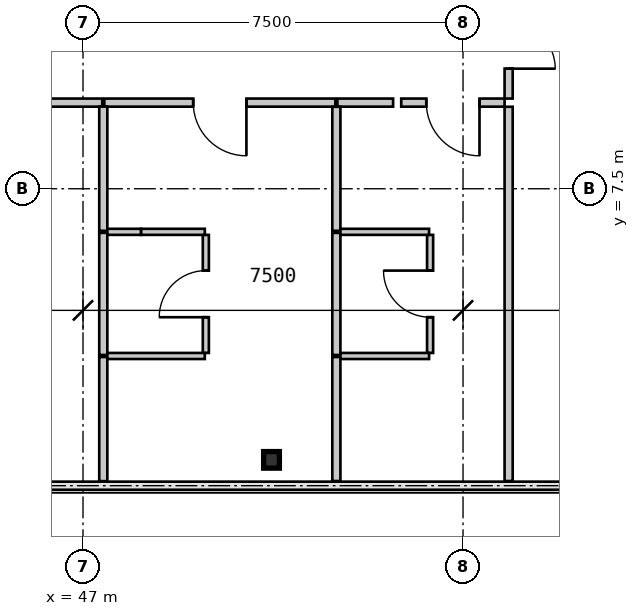
"""IFC4 building model, lengths in metres.
Left out: names, types, materials, properties, quantities, classifications, styles, units other than length and angle.
Written with IfcOpenShell. Run it as: python <this file> out.ifc"""

import sys

from ifc_helpers import new_model, si_unit, direction, frame, frame_2d, origin, origin_2d, place, context, subcontext, project, spatial, rectangle, i_section, extrude, source, transform, mapped, element, fill, save


model = new_model("IFC4")
c1 = context("Model", 3, precision=1e-05, world=origin(), true_north=direction((0.0, 1.0)))
c2 = subcontext(c1, "Body", "Model", "MODEL_VIEW")
j1 = project(units=[si_unit("LENGTHUNIT", "METRE"), si_unit("PLANEANGLEUNIT", "RADIAN")], contexts=[c1])
p1 = place(None, origin())
s1 = spatial("IfcSite", under=j1, at=p1, CompositionType="ELEMENT")
p2 = place(p1, origin())
s2 = spatial("IfcBuilding", under=s1, at=p2, CompositionType="ELEMENT")
p3 = place(p2, frame((0.0, 0.0, 19.95)))
s3 = spatial("IfcBuildingStorey", under=s2, at=p3, CompositionType="ELEMENT", Elevation=19.95)
m1 = source(origin(), c2, "Body", "SweptSolid", [
    extrude(i_section(OverallWidth=0.311, OverallDepth=0.327, WebThickness=0.016, FlangeThickness=0.025, at=origin_2d()), origin(), (0.0, 0.0, 1.0), 3.15),
])
p4 = place(p3, frame((50.72, 2.15, 0.0), z_axis=(0.0, 0.0, 1.0), x_axis=(1.0, 0.0, 0.0)))
e1 = element("IfcColumn", 1, at=p4, inside=s3, PredefinedType="COLUMN", context=c2, shape_type="MappedRepresentation", body=[
    mapped(m1, transform((0.0, 0.0, 0.0), scale=1.0)),
])
m2 = source(origin(), c2, "Body", "SweptSolid", [
    extrude(rectangle(XDim=2.04, YDim=0.16, at=frame_2d((1.02, 0.0))), origin(), (0.0, 0.0, 1.0), 2.93),
])
p5 = place(p3, frame((55.32, 9.2, 0.0), z_axis=(0.0, 0.0, 1.0), x_axis=(-1.0, 0.0, 0.0)))
e2 = element("IfcWall", 2, at=p5, inside=s3, PredefinedType="PARTITIONING", context=c2, shape_type="MappedRepresentation", body=[
    mapped(m2, transform((0.0, 0.0, 0.0), scale=1.0)),
])
m3 = source(origin(), c2, "Body", "SweptSolid", [
    extrude(rectangle(XDim=1.05, YDim=2.1, at=frame_2d((0.525, 1.05))), frame((0.0, 0.09, 0.0), z_axis=(0.0, -1.0, 0.0), x_axis=(1.0, 0.0, 0.0)), (0.0, 0.0, 1.0), 0.18),
])
p6 = place(p5, frame((0.495, 0.0, 0.0)))
e3 = element("IfcOpeningElement", 3, at=p6, cuts=e2, PredefinedType="OPENING", context=c2, shape_type="MappedRepresentation", body=[
    mapped(m3, transform((0.0, 0.0, 0.0), scale=1.0)),
])
m4 = source(origin(), c2, "Body", "SweptSolid", [
    extrude(rectangle(XDim=2.1, YDim=0.16, at=frame_2d((1.05, 0.0))), origin(), (0.0, 0.0, 1.0), 2.93),
])
p7 = place(p3, frame((55.4, 11.38, 0.0), z_axis=(0.0, 0.0, 1.0), x_axis=(0.0, -1.0, 0.0)))
e4 = element("IfcWall", 4, at=p7, inside=s3, PredefinedType="PARTITIONING", context=c2, shape_type="MappedRepresentation", body=[
    mapped(m4, transform((0.0, 0.0, 0.0), scale=1.0)),
])
m5 = source(origin(), c2, "Body", "SweptSolid", [
    extrude(rectangle(XDim=0.92, YDim=2.1, at=frame_2d((0.46, 1.05))), frame((0.0, 0.09, 0.0), z_axis=(0.0, -1.0, 0.0), x_axis=(1.0, 0.0, 0.0)), (0.0, 0.0, 1.0), 0.18),
])
p8 = place(p7, frame((0.59, 0.0, 0.0)))
e5 = element("IfcOpeningElement", 5, at=p8, cuts=e4, PredefinedType="OPENING", context=c2, shape_type="MappedRepresentation", body=[
    mapped(m5, transform((0.0, 0.0, 0.0), scale=1.0)),
])
m6 = source(origin(), c2, "Body", "SweptSolid", [
    extrude(rectangle(XDim=5.36, YDim=0.16, at=frame_2d((2.68, 0.0))), origin(), (0.0, 0.0, 1.0), 2.93),
])
p9 = place(p3, frame((47.38, 9.2, 0.0), z_axis=(0.0, 0.0, 1.0), x_axis=(-1.0, 0.0, 0.0)))
e6 = element("IfcWall", 6, at=p9, inside=s3, PredefinedType="PARTITIONING", context=c2, shape_type="MappedRepresentation", body=[
    mapped(m6, transform((0.0, 0.0, 0.0), scale=1.0)),
])
p10 = place(p9, frame((2.22, 0.0, 0.0)))
e7 = element("IfcOpeningElement", 7, at=p10, cuts=e6, PredefinedType="OPENING", context=c2, shape_type="MappedRepresentation", body=[
    mapped(m5, transform((0.0, 0.0, 0.0), scale=1.0)),
])
m7 = source(origin(), c2, "Body", "SweptSolid", [
    extrude(rectangle(XDim=4.559, YDim=0.16, at=frame_2d((2.28, 0.0))), origin(), (0.0, 0.0, 1.0), 2.93),
])
p11 = place(p3, frame((51.98, 9.2, 0.0), z_axis=(0.0, 0.0, 1.0), x_axis=(-1.0, 0.0, 0.0)))
e8 = element("IfcWall", 8, at=p11, inside=s3, PredefinedType="PARTITIONING", context=c2, shape_type="MappedRepresentation", body=[
    mapped(m7, transform((0.0, 0.0, 0.0), scale=1.0)),
])
p12 = place(p11, frame((1.755, 0.0, 0.0)))
e9 = element("IfcOpeningElement", 9, at=p12, cuts=e8, PredefinedType="OPENING", context=c2, shape_type="MappedRepresentation", body=[
    mapped(m3, transform((0.0, 0.0, 0.0), scale=1.0)),
])
m8 = source(origin(), c2, "Body", "SweptSolid", [
    extrude(rectangle(XDim=1.1, YDim=0.16, at=frame_2d((0.55, 0.0))), origin(), (0.0, 0.0, 1.0), 2.93),
])
p13 = place(p3, frame((53.12, 9.2, 0.0), z_axis=(0.0, 0.0, 1.0), x_axis=(-1.0, 0.0, 0.0)))
e10 = element("IfcWall", 10, at=p13, inside=s3, PredefinedType="PARTITIONING", context=c2, shape_type="MappedRepresentation", body=[
    mapped(m8, transform((0.0, 0.0, 0.0), scale=1.0)),
])
m9 = source(origin(), c2, "Body", "SweptSolid", [
    extrude(rectangle(XDim=2.45, YDim=0.16, at=frame_2d((1.225, 0.0))), origin(), (0.0, 0.0, 1.0), 2.93),
])
p14 = place(p3, frame((47.4, 4.18, 0.0), z_axis=(0.0, 0.0, 1.0), x_axis=(0.0, -1.0, 0.0)))
e11 = element("IfcWall", 11, at=p14, inside=s3, PredefinedType="PARTITIONING", context=c2, shape_type="MappedRepresentation", body=[
    mapped(m9, transform((0.0, 0.0, 0.0), scale=1.0)),
])
m10 = source(origin(), c2, "Body", "SweptSolid", [
    extrude(rectangle(XDim=2.45, YDim=0.16, at=frame_2d((1.225, 0.0))), origin(), (0.0, 0.0, 1.0), 2.93),
])
p15 = place(p3, frame((47.4, 9.12, 0.0), z_axis=(0.0, 0.0, 1.0), x_axis=(0.0, -1.0, 0.0)))
e12 = element("IfcWall", 12, at=p15, inside=s3, PredefinedType="PARTITIONING", context=c2, shape_type="MappedRepresentation", body=[
    mapped(m10, transform((0.0, 0.0, 0.0), scale=1.0)),
])
m11 = source(origin(), c2, "Body", "SweptSolid", [
    extrude(rectangle(XDim=2.41, YDim=0.16, at=frame_2d((1.205, 0.0))), origin(), (0.0, 0.0, 1.0), 2.93),
])
p16 = place(p3, frame((47.4, 6.63, 0.0), z_axis=(0.0, 0.0, 1.0), x_axis=(0.0, -1.0, 0.0)))
e13 = element("IfcWall", 13, at=p16, inside=s3, PredefinedType="PARTITIONING", context=c2, shape_type="MappedRepresentation", body=[
    mapped(m11, transform((0.0, 0.0, 0.0), scale=1.0)),
])
m12 = source(origin(), c2, "Body", "SweptSolid", [
    extrude(rectangle(XDim=2.33, YDim=0.12, at=frame_2d((1.165, 0.0))), origin(), (0.0, 0.0, 1.0), 2.93),
])
p17 = place(p3, frame((49.424, 4.26, 0.0), z_axis=(0.0, 0.0, 1.0), x_axis=(0.0, 1.0, 0.0)))
e14 = element("IfcWall", 14, at=p17, inside=s3, PredefinedType="PARTITIONING", context=c2, shape_type="MappedRepresentation", body=[
    mapped(m12, transform((0.0, 0.0, 0.0), scale=1.0)),
])
m13 = source(origin(), c2, "Body", "SweptSolid", [
    extrude(rectangle(XDim=0.92, YDim=2.1, at=frame_2d((0.46, 1.05))), frame((0.0, 0.07, 0.0), z_axis=(0.0, -1.0, 0.0), x_axis=(1.0, 0.0, 0.0)), (0.0, 0.0, 1.0), 0.14),
])
p18 = place(p17, frame((0.705, 0.0, 0.0)))
e15 = element("IfcOpeningElement", 15, at=p18, cuts=e14, PredefinedType="OPENING", context=c2, shape_type="MappedRepresentation", body=[
    mapped(m13, transform((0.0, 0.0, 0.0), scale=1.0)),
])
m14 = source(origin(), c2, "Body", "SweptSolid", [
    extrude(rectangle(XDim=1.924, YDim=0.12, at=frame_2d((0.962, 0.0))), origin(), (0.0, 0.0, 1.0), 2.93),
])
p19 = place(p3, frame((47.48, 4.2, 0.0), z_axis=(0.0, 0.0, 1.0), x_axis=(1.0, 0.0, 0.0)))
e16 = element("IfcWall", 16, at=p19, inside=s3, PredefinedType="PARTITIONING", context=c2, shape_type="MappedRepresentation", body=[
    mapped(m14, transform((0.0, 0.0, 0.0), scale=1.0)),
])
m15 = source(origin(), c2, "Body", "SweptSolid", [
    extrude(rectangle(XDim=1.26, YDim=0.12, at=frame_2d((0.63, 0.0))), origin(), (0.0, 0.0, 1.0), 2.93),
])
p20 = place(p3, frame((49.404, 6.65, 0.0), z_axis=(0.0, 0.0, 1.0), x_axis=(-1.0, 0.0, 0.0)))
e17 = element("IfcWall", 17, at=p20, inside=s3, PredefinedType="PARTITIONING", context=c2, shape_type="MappedRepresentation", body=[
    mapped(m15, transform((0.0, 0.0, 0.0), scale=1.0)),
])
m16 = source(origin(), c2, "Body", "SweptSolid", [
    extrude(rectangle(XDim=0.664, YDim=0.12, at=frame_2d((0.332, 0.0))), origin(), (0.0, 0.0, 1.0), 2.47),
])
p21 = place(p3, frame((48.144, 6.65, 0.0), z_axis=(0.0, 0.0, 1.0), x_axis=(-1.0, 0.0, 0.0)))
e18 = element("IfcWall", 18, at=p21, inside=s3, PredefinedType="PARTITIONING", context=c2, shape_type="MappedRepresentation", body=[
    mapped(m16, transform((0.0, 0.0, 0.0), scale=1.0)),
])
m17 = source(origin(), c2, "Body", "SweptSolid", [
    extrude(rectangle(XDim=2.448, YDim=0.16, at=frame_2d((1.224, 0.0))), origin(), (0.0, 0.0, 1.0), 2.93),
])
for number, where, z_axis, x_axis in (
    (19, (52.0, 4.18, 0.0), (0.0, 0.0, 1.0), (0.0, -1.0, 0.0)),
    (20, (52.0, 9.118, 0.0), (0.0, 0.0, 1.0), (0.0, -1.0, 0.0)),
):
    element("IfcWall", number, at=place(p3, frame(where, z_axis=z_axis, x_axis=x_axis)), inside=s3, PredefinedType="PARTITIONING", context=c2, shape_type="MappedRepresentation", body=[
        mapped(m17, transform((0.0, 0.0, 0.0), scale=1.0)),
    ])
p22 = place(p3, frame((52.0, 6.63, 0.0), z_axis=(0.0, 0.0, 1.0), x_axis=(0.0, -1.0, 0.0)))
e21 = element("IfcWall", 21, at=p22, inside=s3, PredefinedType="PARTITIONING", context=c2, shape_type="MappedRepresentation", body=[
    mapped(m11, transform((0.0, 0.0, 0.0), scale=1.0)),
])
p23 = place(p3, frame((53.85, 4.26, 0.0), z_axis=(0.0, 0.0, 1.0), x_axis=(0.0, 1.0, 0.0)))
e22 = element("IfcWall", 22, at=p23, inside=s3, PredefinedType="PARTITIONING", context=c2, shape_type="MappedRepresentation", body=[
    mapped(m12, transform((0.0, 0.0, 0.0), scale=1.0)),
])
p24 = place(p23, frame((0.705, 0.0, 0.0)))
e23 = element("IfcOpeningElement", 23, at=p24, cuts=e22, PredefinedType="OPENING", context=c2, shape_type="MappedRepresentation", body=[
    mapped(m13, transform((0.0, 0.0, 0.0), scale=1.0)),
])
m18 = source(origin(), c2, "Body", "SweptSolid", [
    extrude(rectangle(XDim=1.75, YDim=0.12, at=frame_2d((0.875, 0.0))), origin(), (0.0, 0.0, 1.0), 2.93),
])
for number, where, z_axis, x_axis in (
    (24, (52.08, 4.2, 0.0), (0.0, 0.0, 1.0), (1.0, 0.0, 0.0)),
    (25, (53.83, 6.65, 0.0), (0.0, 0.0, 1.0), (-1.0, 0.0, 0.0)),
):
    element("IfcWall", number, at=place(p3, frame(where, z_axis=z_axis, x_axis=x_axis)), inside=s3, PredefinedType="PARTITIONING", context=c2, shape_type="MappedRepresentation", body=[
        mapped(m18, transform((0.0, 0.0, 0.0), scale=1.0)),
    ])
m19 = source(origin(), c2, "Body", "SweptSolid", [
    extrude(rectangle(XDim=7.386, YDim=0.16, at=frame_2d((3.693, 0.0))), origin(), (0.0, 0.0, 1.0), 2.93),
])
p25 = place(p3, frame((55.4, 9.118, 0.0), z_axis=(0.0, 0.0, 1.0), x_axis=(0.0, -1.0, 0.0)))
e26 = element("IfcWall", 26, at=p25, inside=s3, PredefinedType="PARTITIONING", context=c2, shape_type="MappedRepresentation", body=[
    mapped(m19, transform((0.0, 0.0, 0.0), scale=1.0)),
])
m20 = source(origin(), c2, "Body", "SweptSolid", [
    extrude(rectangle(XDim=1.05, YDim=2.1, at=frame_2d((0.525, 1.05))), frame((0.0, 0.025, 0.0), z_axis=(0.0, -1.0, 0.0), x_axis=(1.0, 0.0, 0.0)), (0.0, 0.0, 1.0), 0.05),
])
p26 = place(p6, origin())
e27 = element("IfcDoor", 27, at=p26, inside=s3, OperationType="SINGLE_SWING_LEFT", PredefinedType="DOOR", context=c2, shape_type="MappedRepresentation", body=[
    mapped(m20, transform((0.0, 0.0, 0.0), scale=1.0)),
])
fill(e3, e27)
m21 = source(origin(), c2, "Body", "SweptSolid", [
    extrude(rectangle(XDim=0.92, YDim=2.1, at=frame_2d((0.46, 1.05))), frame((0.0, 0.025, 0.0), z_axis=(0.0, -1.0, 0.0), x_axis=(1.0, 0.0, 0.0)), (0.0, 0.0, 1.0), 0.05),
])
p27 = place(p8, origin())
e28 = element("IfcDoor", 28, at=p27, inside=s3, OperationType="SINGLE_SWING_RIGHT", PredefinedType="DOOR", context=c2, shape_type="MappedRepresentation", body=[
    mapped(m21, transform((0.0, 0.0, 0.0), scale=1.0)),
])
fill(e5, e28)
p28 = place(p12, origin())
e29 = element("IfcDoor", 29, at=p28, inside=s3, OperationType="SINGLE_SWING_LEFT", PredefinedType="DOOR", context=c2, shape_type="MappedRepresentation", body=[
    mapped(m20, transform((0.0, 0.0, 0.0), scale=1.0)),
])
fill(e9, e29)
p29 = place(p18, origin())
e30 = element("IfcDoor", 30, at=p29, inside=s3, OperationType="SINGLE_SWING_LEFT", PredefinedType="DOOR", context=c2, shape_type="MappedRepresentation", body=[
    mapped(m21, transform((0.0, 0.0, 0.0), scale=1.0)),
])
fill(e15, e30)
p30 = place(p24, origin())
e31 = element("IfcDoor", 31, at=p30, inside=s3, OperationType="SINGLE_SWING_RIGHT", PredefinedType="DOOR", context=c2, shape_type="MappedRepresentation", body=[
    mapped(m21, transform((0.0, 0.0, 0.0), scale=1.0)),
])
fill(e23, e31)
save(model, sys.argv[1])
